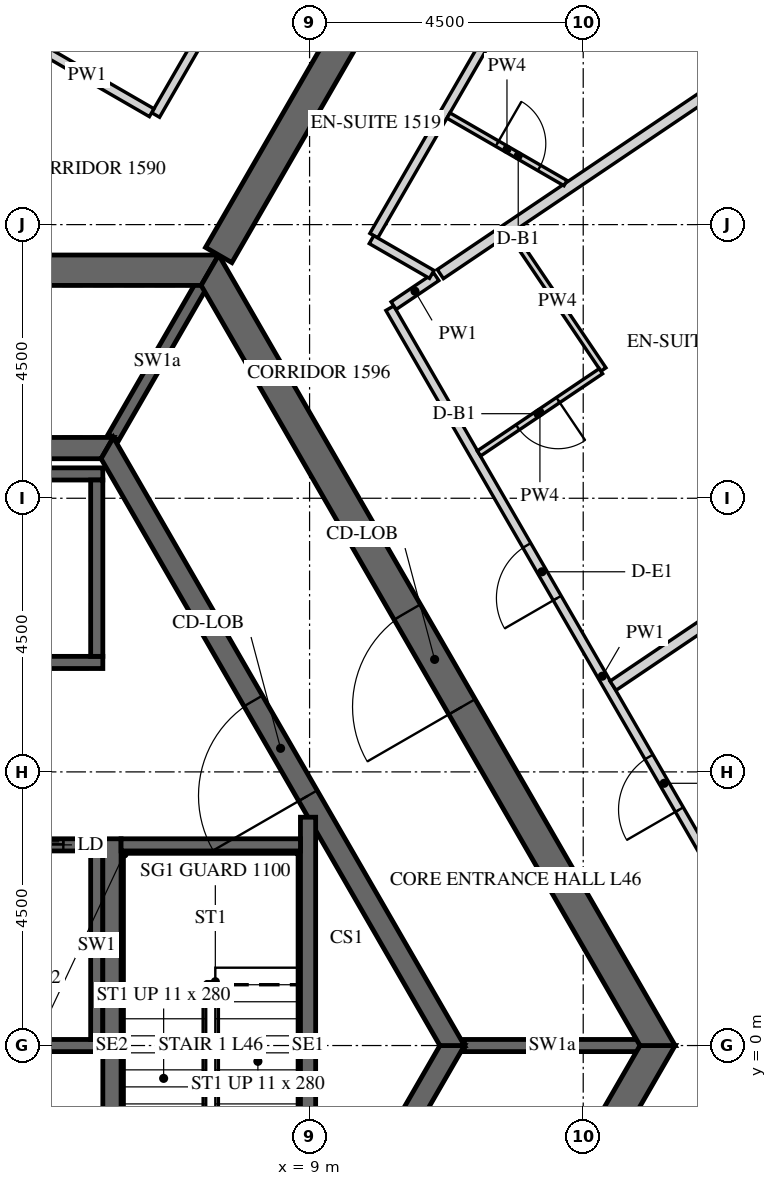
"""IFC4 building model, lengths in metres.
Left out: names, types, materials, properties, quantities, classifications, styles, units other than length and angle.
Written with IfcOpenShell. Run it as: python <this file> out.ifc"""

import sys

from ifc_helpers import new_model, si_unit, direction, frame, frame_2d, origin, place, context, subcontext, project, spatial, polyline, rectangle, outline, extrude, element, fill, save


model = new_model("IFC4")
c1 = context("Model", 3, precision=1e-05, world=origin(), true_north=direction((0.0, 1.0)))
c2 = subcontext(c1, "Body", "Model", "MODEL_VIEW")
j1 = project(units=[si_unit("LENGTHUNIT", "METRE"), si_unit("PLANEANGLEUNIT", "RADIAN")], contexts=[c1])
p1 = place(None, origin())
s1 = spatial("IfcSite", under=j1, at=p1, CompositionType="ELEMENT")
p2 = place(p1, origin())
s2 = spatial("IfcBuilding", under=s1, at=p2, CompositionType="ELEMENT")
p3 = place(p2, frame((0.0, 0.0, 195.6)))
s3 = spatial("IfcBuildingStorey", under=s2, at=p3, CompositionType="ELEMENT", Elevation=195.6)
p4 = place(p3, frame((7.361, -12.75, -0.15), z_axis=(0.0, 0.0, 1.0), x_axis=(0.50000571537, 0.866022103989, 0.0)))
e1 = element("IfcWall", 1, at=p4, inside=s3, PredefinedType="SHEAR", context=c2, shape_type="SweptSolid", body=[
    extrude(outline(polyline([(-0.144, -0.25), (14.867, -0.25), (14.578, 0.25), (0.144, 0.25), (-0.144, -0.25)])), origin(), (0.0, 0.0, 1.0), 3.9),
])
p5 = place(p4, frame((6.49, 0.0, 0.15)))
e2 = element("IfcOpeningElement", 2, at=p5, cuts=e1, PredefinedType="OPENING", context=c2, shape_type="SweptSolid", body=[
    extrude(rectangle(XDim=1.8, YDim=2.4, at=frame_2d((0.9, 1.2))), frame((0.0, 0.26, 0.0), z_axis=(0.0, -1.0, 0.0), x_axis=(1.0, 0.0, 0.0)), (0.0, 0.0, 1.0), 0.52),
])
p6 = place(p3, frame((14.722, 0.0, -0.15), z_axis=(0.0, 0.0, 1.0), x_axis=(-0.50000571537, 0.866022103989, 0.0)))
e3 = element("IfcWall", 3, at=p6, inside=s3, PredefinedType="SHEAR", context=c2, shape_type="SweptSolid", body=[
    extrude(outline(polyline([(-0.144, -0.25), (14.867, -0.25), (14.578, 0.25), (0.144, 0.25), (-0.144, -0.25)])), origin(), (0.0, 0.0, 1.0), 3.9),
])
p7 = place(p6, frame((6.432, 0.0, 0.15)))
e4 = element("IfcOpeningElement", 4, at=p7, cuts=e3, PredefinedType="OPENING", context=c2, shape_type="SweptSolid", body=[
    extrude(rectangle(XDim=1.8, YDim=2.4, at=frame_2d((0.9, 1.2))), frame((0.0, 0.26, 0.0), z_axis=(0.0, -1.0, 0.0), x_axis=(1.0, 0.0, 0.0)), (0.0, 0.0, 1.0), 0.52),
])
p8 = place(p3, frame((7.361, 12.75, -0.15), z_axis=(0.0, 0.0, 1.0), x_axis=(-1.0, 0.0, 0.0)))
e5 = element("IfcWall", 5, at=p8, inside=s3, PredefinedType="SHEAR", context=c2, shape_type="SweptSolid", body=[
    extrude(outline(polyline([(-0.144, -0.25), (14.866, -0.25), (14.578, 0.25), (0.144, 0.25), (-0.144, -0.25)])), origin(), (0.0, 0.0, 1.0), 3.9),
])
p9 = place(p8, frame((6.761, 0.0, 0.15)))
e6 = element("IfcOpeningElement", 6, at=p9, cuts=e5, PredefinedType="OPENING", context=c2, shape_type="SweptSolid", body=[
    extrude(rectangle(XDim=1.2, YDim=2.4, at=frame_2d((0.6, 1.2))), frame((0.0, 0.26, 0.0), z_axis=(0.0, -1.0, 0.0), x_axis=(1.0, 0.0, 0.0)), (0.0, 0.0, 1.0), 0.52),
])
p10 = place(p3, frame((7.506, 13.0, -0.15), z_axis=(0.0, 0.0, 1.0), x_axis=(0.499988271576, 0.866032175087, 0.0)))
e7 = element("IfcWall", 7, at=p10, inside=s3, PredefinedType="SHEAR", context=c2, shape_type="SweptSolid", body=[
    extrude(rectangle(XDim=15.424, YDim=0.5, at=frame_2d((7.712, 0.0))), origin(), (0.0, 0.0, 1.0), 3.9),
])
p11 = place(p10, frame((6.812, 0.0, 0.15)))
e8 = element("IfcOpeningElement", 8, at=p11, cuts=e7, PredefinedType="OPENING", context=c2, shape_type="SweptSolid", body=[
    extrude(rectangle(XDim=1.8, YDim=2.4, at=frame_2d((0.9, 1.2))), frame((0.0, 0.26, 0.0), z_axis=(0.0, -1.0, 0.0), x_axis=(1.0, 0.0, 0.0)), (0.0, 0.0, 1.0), 0.52),
])
p12 = place(p3, frame((5.673, -9.825, -0.15), z_axis=(0.0, 0.0, 1.0), x_axis=(0.499995046907, 0.866028263435, 0.0)))
e9 = element("IfcWall", 9, at=p12, inside=s3, PredefinedType="SHEAR", context=c2, shape_type="SweptSolid", body=[
    extrude(outline(polyline([(-0.101, -0.175), (11.446, -0.175), (11.244, 0.175), (0.101, 0.175), (-0.101, -0.175)])), origin(), (0.0, 0.0, 1.0), 3.9),
])
p13 = place(p12, frame((4.801, 0.0, 0.15)))
e10 = element("IfcOpeningElement", 10, at=p13, cuts=e9, PredefinedType="OPENING", context=c2, shape_type="SweptSolid", body=[
    extrude(rectangle(XDim=1.8, YDim=2.4, at=frame_2d((0.9, 1.2))), frame((0.0, 0.185, 0.0), z_axis=(0.0, -1.0, 0.0), x_axis=(1.0, 0.0, 0.0)), (0.0, 0.0, 1.0), 0.37),
])
p14 = place(p3, frame((11.345, 0.0, -0.15), z_axis=(0.0, 0.0, 1.0), x_axis=(-0.499995046907, 0.866028263435, 0.0)))
e11 = element("IfcWall", 11, at=p14, inside=s3, PredefinedType="SHEAR", context=c2, shape_type="SweptSolid", body=[
    extrude(outline(polyline([(-0.101, -0.175), (11.446, -0.175), (11.244, 0.175), (0.101, 0.175), (-0.101, -0.175)])), origin(), (0.0, 0.0, 1.0), 3.9),
])
p15 = place(p14, frame((4.744, 0.0, 0.15)))
e12 = element("IfcOpeningElement", 12, at=p15, cuts=e11, PredefinedType="OPENING", context=c2, shape_type="SweptSolid", body=[
    extrude(rectangle(XDim=1.8, YDim=2.4, at=frame_2d((0.9, 1.2))), frame((0.0, 0.185, 0.0), z_axis=(0.0, -1.0, 0.0), x_axis=(1.0, 0.0, 0.0)), (0.0, 0.0, 1.0), 0.37),
])
p16 = place(p3, frame((5.673, 9.825, -0.15), z_axis=(0.0, 0.0, 1.0), x_axis=(-1.0, 0.0, 0.0)))
e13 = element("IfcWall", 13, at=p16, inside=s3, PredefinedType="SHEAR", context=c2, shape_type="SweptSolid", body=[
    extrude(outline(polyline([(-0.101, -0.175), (11.446, -0.175), (11.244, 0.175), (0.101, 0.175), (-0.101, -0.175)])), origin(), (0.0, 0.0, 1.0), 3.9),
])
p17 = place(p3, frame((-5.6, 6.3, -0.25), z_axis=(0.0, 0.0, 1.0), x_axis=(1.0, 0.0, 0.0)))
e14 = element("IfcWall", 14, at=p17, inside=s3, PredefinedType="SHEAR", context=c2, shape_type="SweptSolid", body=[
    extrude(rectangle(XDim=11.2, YDim=0.2, at=frame_2d((5.6, 0.0))), origin(), (0.0, 0.0, 1.0), 3.9),
])
p18 = place(p17, frame((8.45, 0.0, 0.25)))
e15 = element("IfcOpeningElement", 15, at=p18, cuts=e14, PredefinedType="OPENING", context=c2, shape_type="SweptSolid", body=[
    extrude(rectangle(XDim=0.9, YDim=2.1, at=frame_2d((0.45, 1.05))), frame((0.0, 0.11, 0.0), z_axis=(0.0, -1.0, 0.0), x_axis=(1.0, 0.0, 0.0)), (0.0, 0.0, 1.0), 0.22),
])
p19 = place(p17, frame((0.65, 0.0, 0.25)))
e16 = element("IfcOpeningElement", 16, at=p19, cuts=e14, PredefinedType="OPENING", context=c2, shape_type="SweptSolid", body=[
    extrude(rectangle(XDim=1.1, YDim=2.1, at=frame_2d((0.55, 1.05))), frame((0.0, 0.11, 0.0), z_axis=(0.0, -1.0, 0.0), x_axis=(1.0, 0.0, 0.0)), (0.0, 0.0, 1.0), 0.22),
])
p20 = place(p17, frame((2.85, 0.0, 0.25)))
e17 = element("IfcOpeningElement", 17, at=p20, cuts=e14, PredefinedType="OPENING", context=c2, shape_type="SweptSolid", body=[
    extrude(rectangle(XDim=1.1, YDim=2.1, at=frame_2d((0.55, 1.05))), frame((0.0, 0.11, 0.0), z_axis=(0.0, -1.0, 0.0), x_axis=(1.0, 0.0, 0.0)), (0.0, 0.0, 1.0), 0.22),
])
p21 = place(p17, frame((5.05, 0.0, 0.25)))
e18 = element("IfcOpeningElement", 18, at=p21, cuts=e14, PredefinedType="OPENING", context=c2, shape_type="SweptSolid", body=[
    extrude(rectangle(XDim=1.1, YDim=2.1, at=frame_2d((0.55, 1.05))), frame((0.0, 0.11, 0.0), z_axis=(0.0, -1.0, 0.0), x_axis=(1.0, 0.0, 0.0)), (0.0, 0.0, 1.0), 0.22),
])
p22 = place(p3, frame((-5.6, 9.4, -0.25), z_axis=(0.0, 0.0, 1.0), x_axis=(1.0, 0.0, 0.0)))
e19 = element("IfcWall", 19, at=p22, inside=s3, PredefinedType="SHEAR", context=c2, shape_type="SweptSolid", body=[
    extrude(rectangle(XDim=11.2, YDim=0.2, at=frame_2d((5.6, 0.0))), origin(), (0.0, 0.0, 1.0), 3.9),
])
p23 = place(p3, frame((5.5, 6.4, -0.25), z_axis=(0.0, 0.0, 1.0), x_axis=(0.0, 1.0, 0.0)))
e20 = element("IfcWall", 20, at=p23, inside=s3, PredefinedType="SHEAR", context=c2, shape_type="SweptSolid", body=[
    extrude(rectangle(XDim=2.9, YDim=0.2, at=frame_2d((1.45, 0.0))), origin(), (0.0, 0.0, 1.0), 3.9),
])
p24 = place(p3, frame((-5.6, 3.3, -0.25), z_axis=(0.0, 0.0, 1.0), x_axis=(1.0, 0.0, 0.0)))
e21 = element("IfcWall", 21, at=p24, inside=s3, PredefinedType="SHEAR", context=c2, shape_type="SweptSolid", body=[
    extrude(rectangle(XDim=11.2, YDim=0.2, at=frame_2d((5.6, 0.0))), origin(), (0.0, 0.0, 1.0), 3.9),
])
p25 = place(p24, frame((0.65, 0.0, 0.25)))
e22 = element("IfcOpeningElement", 22, at=p25, cuts=e21, PredefinedType="OPENING", context=c2, shape_type="SweptSolid", body=[
    extrude(rectangle(XDim=1.1, YDim=2.1, at=frame_2d((0.55, 1.05))), frame((0.0, 0.11, 0.0), z_axis=(0.0, -1.0, 0.0), x_axis=(1.0, 0.0, 0.0)), (0.0, 0.0, 1.0), 0.22),
])
p26 = place(p24, frame((2.85, 0.0, 0.25)))
e23 = element("IfcOpeningElement", 23, at=p26, cuts=e21, PredefinedType="OPENING", context=c2, shape_type="SweptSolid", body=[
    extrude(rectangle(XDim=1.1, YDim=2.1, at=frame_2d((0.55, 1.05))), frame((0.0, 0.11, 0.0), z_axis=(0.0, -1.0, 0.0), x_axis=(1.0, 0.0, 0.0)), (0.0, 0.0, 1.0), 0.22),
])
p27 = place(p24, frame((5.05, 0.0, 0.25)))
e24 = element("IfcOpeningElement", 24, at=p27, cuts=e21, PredefinedType="OPENING", context=c2, shape_type="SweptSolid", body=[
    extrude(rectangle(XDim=1.1, YDim=2.1, at=frame_2d((0.55, 1.05))), frame((0.0, 0.11, 0.0), z_axis=(0.0, -1.0, 0.0), x_axis=(1.0, 0.0, 0.0)), (0.0, 0.0, 1.0), 0.22),
])
p28 = place(p24, frame((7.25, 0.0, 0.25)))
e25 = element("IfcOpeningElement", 25, at=p28, cuts=e21, PredefinedType="OPENING", context=c2, shape_type="SweptSolid", body=[
    extrude(rectangle(XDim=1.1, YDim=2.1, at=frame_2d((0.55, 1.05))), frame((0.0, 0.11, 0.0), z_axis=(0.0, -1.0, 0.0), x_axis=(1.0, 0.0, 0.0)), (0.0, 0.0, 1.0), 0.22),
])
p29 = place(p24, frame((9.45, 0.0, 0.25)))
e26 = element("IfcOpeningElement", 26, at=p29, cuts=e21, PredefinedType="OPENING", context=c2, shape_type="SweptSolid", body=[
    extrude(rectangle(XDim=1.1, YDim=2.1, at=frame_2d((0.55, 1.05))), frame((0.0, 0.11, 0.0), z_axis=(0.0, -1.0, 0.0), x_axis=(1.0, 0.0, 0.0)), (0.0, 0.0, 1.0), 0.22),
])
p30 = place(p3, frame((-5.6, 0.0, -0.25), z_axis=(0.0, 0.0, 1.0), x_axis=(1.0, 0.0, 0.0)))
e27 = element("IfcWall", 27, at=p30, inside=s3, PredefinedType="SHEAR", context=c2, shape_type="SweptSolid", body=[
    extrude(rectangle(XDim=11.2, YDim=0.2, at=frame_2d((5.6, 0.0))), origin(), (0.0, 0.0, 1.0), 3.9),
])
p31 = place(p3, frame((5.5, 0.1, -0.25), z_axis=(0.0, 0.0, 1.0), x_axis=(0.0, 1.0, 0.0)))
e28 = element("IfcWall", 28, at=p31, inside=s3, PredefinedType="SHEAR", context=c2, shape_type="SweptSolid", body=[
    extrude(rectangle(XDim=3.1, YDim=0.2, at=frame_2d((1.55, 0.0))), origin(), (0.0, 0.0, 1.0), 3.9),
])
for number, where, z_axis, x_axis in (
    (29, (11.547, 0.0, -0.15), (0.0, 0.0, 1.0), (1.0, 0.0, 0.0)),
    (30, (5.773, 10.0, -0.15), (0.0, 0.0, 1.0), (0.5, 0.866, 0.0)),
):
    element("IfcWall", number, at=place(p3, frame(where, z_axis=z_axis, x_axis=x_axis)), inside=s3, PredefinedType="SHEAR", context=c2, shape_type="SweptSolid", body=[
        extrude(rectangle(XDim=2.887, YDim=0.2, at=frame_2d((1.443, 0.0))), origin(), (0.0, 0.0, 1.0), 3.9),
    ])
p32 = place(p3, frame((5.75, -3.4, -0.25), z_axis=(0.0, 0.0, 1.0), x_axis=(0.0, 1.0, 0.0)))
e31 = element("IfcWall", 31, at=p32, inside=s3, PredefinedType="SHEAR", context=c2, shape_type="SweptSolid", body=[
    extrude(rectangle(XDim=6.8, YDim=0.3, at=frame_2d((3.4, 0.0))), origin(), (0.0, 0.0, 1.0), 3.9),
])
p33 = place(p3, frame((8.975, -3.755, -0.25), z_axis=(0.0, 0.0, 1.0), x_axis=(0.0, 1.0, 0.0)))
e32 = element("IfcWall", 32, at=p33, inside=s3, PredefinedType="SHEAR", context=c2, shape_type="SweptSolid", body=[
    extrude(rectangle(XDim=7.51, YDim=0.25, at=frame_2d((3.755, 0.0))), origin(), (0.0, 0.0, 1.0), 3.9),
])
p34 = place(p3, frame((5.9, 3.3, -0.25), z_axis=(0.0, 0.0, 1.0), x_axis=(1.0, 0.0, 0.0)))
e33 = element("IfcWall", 33, at=p34, inside=s3, PredefinedType="SHEAR", context=c2, shape_type="SweptSolid", body=[
    extrude(rectangle(XDim=2.95, YDim=0.2, at=frame_2d((1.475, 0.0))), origin(), (0.0, 0.0, 1.0), 3.9),
])
p35 = place(p3, frame((10.149, 21.678, 0.0), z_axis=(0.0, 0.0, 1.0), x_axis=(-0.500020076982, -0.866013812023, 0.0)))
e34 = element("IfcWall", 34, at=p35, inside=s3, PredefinedType="PARTITIONING", context=c2, shape_type="SweptSolid", body=[
    extrude(rectangle(XDim=7.361, YDim=0.15, at=frame_2d((3.681, 0.0))), origin(), (0.0, 0.0, 1.0), 2.988),
])
p36 = place(p35, frame((2.018, 0.0, 0.0)))
e35 = element("IfcOpeningElement", 35, at=p36, cuts=e34, PredefinedType="OPENING", context=c2, shape_type="SweptSolid", body=[
    extrude(rectangle(XDim=1.0, YDim=2.1, at=frame_2d((0.5, 1.05))), frame((0.0, 0.085, 0.0), z_axis=(0.0, -1.0, 0.0), x_axis=(1.0, 0.0, 0.0)), (0.0, 0.0, 1.0), 0.17),
])
p37 = place(p3, frame((6.403, 15.341, 0.0), z_axis=(0.0, 0.0, 1.0), x_axis=(-0.8660013066, 0.500041735226, 0.0)))
e36 = element("IfcWall", 36, at=p37, inside=s3, PredefinedType="PARTITIONING", context=c2, shape_type="SweptSolid", body=[
    extrude(rectangle(XDim=2.449, YDim=0.15, at=frame_2d((1.225, 0.0))), origin(), (0.0, 0.0, 1.0), 2.988),
])
p38 = place(p3, frame((9.887, -12.875, 0.0), z_axis=(0.0, 0.0, 1.0), x_axis=(0.499998228944, 0.866026426302, 0.0)))
e37 = element("IfcWall", 37, at=p38, inside=s3, PredefinedType="PARTITIONING", context=c2, shape_type="SweptSolid", body=[
    extrude(rectangle(XDim=14.867, YDim=0.15, at=frame_2d((7.433, 0.0))), origin(), (0.0, 0.0, 1.0), 2.988),
])
p39 = place(p38, frame((3.519, 0.0, 0.0)))
e38 = element("IfcOpeningElement", 38, at=p39, cuts=e37, PredefinedType="OPENING", context=c2, shape_type="SweptSolid", body=[
    extrude(rectangle(XDim=1.0, YDim=2.1, at=frame_2d((0.5, 1.05))), frame((0.0, 0.085, 0.0), z_axis=(0.0, -1.0, 0.0), x_axis=(1.0, 0.0, 0.0)), (0.0, 0.0, 1.0), 0.17),
])
p40 = place(p38, frame((6.824, 0.0, 0.0)))
e39 = element("IfcOpeningElement", 39, at=p40, cuts=e37, PredefinedType="OPENING", context=c2, shape_type="SweptSolid", body=[
    extrude(rectangle(XDim=1.0, YDim=2.1, at=frame_2d((0.5, 1.05))), frame((0.0, 0.085, 0.0), z_axis=(0.0, -1.0, 0.0), x_axis=(1.0, 0.0, 0.0)), (0.0, 0.0, 1.0), 0.17),
])
p41 = place(p38, frame((10.424, 0.0, 0.0)))
e40 = element("IfcOpeningElement", 40, at=p41, cuts=e37, PredefinedType="OPENING", context=c2, shape_type="SweptSolid", body=[
    extrude(rectangle(XDim=1.0, YDim=2.1, at=frame_2d((0.5, 1.05))), frame((0.0, 0.085, 0.0), z_axis=(0.0, -1.0, 0.0), x_axis=(1.0, 0.0, 0.0)), (0.0, 0.0, 1.0), 0.17),
])
p42 = place(p38, frame((13.667, 0.0, 0.0)))
e41 = element("IfcOpeningElement", 41, at=p42, cuts=e37, PredefinedType="OPENING", context=c2, shape_type="SweptSolid", body=[
    extrude(rectangle(XDim=1.0, YDim=2.1, at=frame_2d((0.5, 1.05))), frame((0.0, 0.085, 0.0), z_axis=(0.0, -1.0, 0.0), x_axis=(1.0, 0.0, 0.0)), (0.0, 0.0, 1.0), 0.17),
])
p43 = place(p3, frame((17.308, 0.022, 0.0), z_axis=(0.0, 0.0, 1.0), x_axis=(-0.500009245501, 0.866020065826, 0.0)))
e42 = element("IfcWall", 42, at=p43, inside=s3, PredefinedType="PARTITIONING", context=c2, shape_type="SweptSolid", body=[
    extrude(rectangle(XDim=13.976, YDim=0.15, at=frame_2d((6.988, 0.0))), origin(), (0.0, 0.0, 1.0), 2.988),
])
p44 = place(p43, frame((4.454, 0.0, 0.0)))
e43 = element("IfcOpeningElement", 43, at=p44, cuts=e42, PredefinedType="OPENING", context=c2, shape_type="SweptSolid", body=[
    extrude(rectangle(XDim=1.0, YDim=2.1, at=frame_2d((0.5, 1.05))), frame((0.0, 0.085, 0.0), z_axis=(0.0, -1.0, 0.0), x_axis=(1.0, 0.0, 0.0)), (0.0, 0.0, 1.0), 0.17),
])
p45 = place(p43, frame((8.471, 0.0, 0.0)))
e44 = element("IfcOpeningElement", 44, at=p45, cuts=e42, PredefinedType="OPENING", context=c2, shape_type="SweptSolid", body=[
    extrude(rectangle(XDim=1.0, YDim=2.1, at=frame_2d((0.5, 1.05))), frame((0.0, 0.085, 0.0), z_axis=(0.0, -1.0, 0.0), x_axis=(1.0, 0.0, 0.0)), (0.0, 0.0, 1.0), 0.17),
])
p46 = place(p3, frame((10.382, 12.168, 0.0), z_axis=(0.0, 0.0, 1.0), x_axis=(0.828935479655, 0.559344232623, 0.0)))
e45 = element("IfcWall", 45, at=p46, inside=s3, PredefinedType="PARTITIONING", context=c2, shape_type="SweptSolid", body=[
    extrude(rectangle(XDim=0.848, YDim=0.15, at=frame_2d((0.424, 0.0))), origin(), (0.0, 0.0, 1.0), 2.988),
])
p47 = place(p3, frame((10.056, 13.318, 0.0), z_axis=(0.0, 0.0, 1.0), x_axis=(0.499995202058, 0.86602817386, 0.0)))
e46 = element("IfcWall", 46, at=p47, inside=s3, PredefinedType="PARTITIONING", context=c2, shape_type="SweptSolid", body=[
    extrude(rectangle(XDim=7.361, YDim=0.15, at=frame_2d((3.68, 0.0))), origin(), (0.0, 0.0, 1.0), 2.988),
])
p48 = place(p47, frame((4.168, 0.0, 0.0)))
e47 = element("IfcOpeningElement", 47, at=p48, cuts=e46, PredefinedType="OPENING", context=c2, shape_type="SweptSolid", body=[
    extrude(rectangle(XDim=1.0, YDim=2.1, at=frame_2d((0.5, 1.05))), frame((0.0, 0.085, 0.0), z_axis=(0.0, -1.0, 0.0), x_axis=(1.0, 0.0, 0.0)), (0.0, 0.0, 1.0), 0.17),
])
p49 = place(p3, frame((11.009, 12.681, 0.0), z_axis=(0.0, 0.0, 1.0), x_axis=(-0.86605406138, 0.499950360304, 0.0)))
e48 = element("IfcWall", 48, at=p49, inside=s3, PredefinedType="PARTITIONING", context=c2, shape_type="SweptSolid", body=[
    extrude(rectangle(XDim=1.144, YDim=0.15, at=frame_2d((0.572, 0.0))), origin(), (0.0, 0.0, 1.0), 2.988),
])
p50 = place(p3, frame((24.389, 12.931, 0.0), z_axis=(0.0, 0.0, 1.0), x_axis=(-0.829040439793, -0.559188652593, 0.0)))
e49 = element("IfcWall", 49, at=p50, inside=s3, PredefinedType="PARTITIONING", context=c2, shape_type="SweptSolid", body=[
    extrude(rectangle(XDim=12.542, YDim=0.18, at=frame_2d((6.271, 0.0))), origin(), (0.0, 0.0, 1.0), 2.988),
])
p51 = place(p3, frame((12.317, 13.364, 0.0), z_axis=(0.0, 0.0, 1.0), x_axis=(0.559203592691, -0.829030362485, 0.0)))
e50 = element("IfcWall", 50, at=p51, inside=s3, PredefinedType="PARTITIONING", context=c2, shape_type="SweptSolid", body=[
    extrude(rectangle(XDim=2.71, YDim=0.1, at=frame_2d((1.355, 0.0))), origin(), (0.0, 0.0, 1.0), 2.988),
])
p52 = place(p3, frame((13.791, 11.09, 0.0), z_axis=(0.0, 0.0, 1.0), x_axis=(-0.829056894888, -0.559164255866, 0.0)))
e51 = element("IfcWall", 51, at=p52, inside=s3, PredefinedType="PARTITIONING", context=c2, shape_type="SweptSolid", body=[
    extrude(rectangle(XDim=2.419, YDim=0.1, at=frame_2d((1.209, 0.0))), origin(), (0.0, 0.0, 1.0), 2.988),
])
p53 = place(p52, frame((0.85, 0.0, 0.0)))
e52 = element("IfcOpeningElement", 52, at=p53, cuts=e51, PredefinedType="OPENING", context=c2, shape_type="SweptSolid", body=[
    extrude(rectangle(XDim=0.8, YDim=2.1, at=frame_2d((0.4, 1.05))), frame((0.0, 0.06, 0.0), z_axis=(0.0, -1.0, 0.0), x_axis=(1.0, 0.0, 0.0)), (0.0, 0.0, 1.0), 0.12),
])
p54 = place(p3, frame((20.363, 18.9, 0.0), z_axis=(0.0, 0.0, 1.0), x_axis=(-0.82903304346, -0.559199618072, 0.0)))
e53 = element("IfcWall", 53, at=p54, inside=s3, PredefinedType="PARTITIONING", context=c2, shape_type="SweptSolid", body=[
    extrude(rectangle(XDim=11.112, YDim=0.18, at=frame_2d((5.556, 0.0))), origin(), (0.0, 0.0, 1.0), 2.988),
])
p55 = place(p3, frame((11.284, 15.294, 0.0), z_axis=(0.0, 0.0, 1.0), x_axis=(0.866017295027, -0.500014044516, 0.0)))
e54 = element("IfcWall", 54, at=p55, inside=s3, PredefinedType="PARTITIONING", context=c2, shape_type="SweptSolid", body=[
    extrude(rectangle(XDim=2.223, YDim=0.1, at=frame_2d((1.111, 0.0))), origin(), (0.0, 0.0, 1.0), 2.988),
])
p56 = place(p55, frame((0.925, 0.0, 0.0)))
e55 = element("IfcOpeningElement", 55, at=p56, cuts=e54, PredefinedType="OPENING", context=c2, shape_type="SweptSolid", body=[
    extrude(rectangle(XDim=0.8, YDim=2.1, at=frame_2d((0.4, 1.05))), frame((0.0, 0.06, 0.0), z_axis=(0.0, -1.0, 0.0), x_axis=(1.0, 0.0, 0.0)), (0.0, 0.0, 1.0), 0.12),
])
p57 = place(p7, origin())
e56 = element("IfcDoor", 56, at=p57, inside=s3, OperationType="DOUBLE_DOOR_SINGLE_SWING", PredefinedType="DOOR", context=c2, shape_type="SweptSolid", body=[
    extrude(rectangle(XDim=1.8, YDim=2.4, at=frame_2d((0.9, 1.2))), frame((0.0, 0.025, 0.0), z_axis=(0.0, -1.0, 0.0), x_axis=(1.0, 0.0, 0.0)), (0.0, 0.0, 1.0), 0.05),
])
fill(e4, e56)
p58 = place(p15, origin())
e57 = element("IfcDoor", 57, at=p58, inside=s3, OperationType="DOUBLE_DOOR_SINGLE_SWING", PredefinedType="DOOR", context=c2, shape_type="SweptSolid", body=[
    extrude(rectangle(XDim=1.8, YDim=2.4, at=frame_2d((0.9, 1.2))), frame((0.0, 0.025, 0.0), z_axis=(0.0, -1.0, 0.0), x_axis=(1.0, 0.0, 0.0)), (0.0, 0.0, 1.0), 0.05),
])
fill(e12, e57)
p59 = place(p29, origin())
e58 = element("IfcDoor", 58, at=p59, inside=s3, OperationType="SLIDING_TO_LEFT", PredefinedType="DOOR", context=c2, shape_type="SweptSolid", body=[
    extrude(rectangle(XDim=1.1, YDim=2.1, at=frame_2d((0.55, 1.05))), frame((0.0, 0.025, 0.0), z_axis=(0.0, -1.0, 0.0), x_axis=(1.0, 0.0, 0.0)), (0.0, 0.0, 1.0), 0.05),
])
fill(e26, e58)
p60 = place(p44, origin())
e59 = element("IfcDoor", 59, at=p60, inside=s3, OperationType="SINGLE_SWING_LEFT", PredefinedType="DOOR", context=c2, shape_type="SweptSolid", body=[
    extrude(rectangle(XDim=1.0, YDim=2.1, at=frame_2d((0.5, 1.05))), frame((0.0, 0.025, 0.0), z_axis=(0.0, -1.0, 0.0), x_axis=(1.0, 0.0, 0.0)), (0.0, 0.0, 1.0), 0.05),
])
fill(e43, e59)
p61 = place(p45, origin())
e60 = element("IfcDoor", 60, at=p61, inside=s3, OperationType="SINGLE_SWING_RIGHT", PredefinedType="DOOR", context=c2, shape_type="SweptSolid", body=[
    extrude(rectangle(XDim=1.0, YDim=2.1, at=frame_2d((0.5, 1.05))), frame((0.0, 0.025, 0.0), z_axis=(0.0, -1.0, 0.0), x_axis=(1.0, 0.0, 0.0)), (0.0, 0.0, 1.0), 0.05),
])
fill(e44, e60)
p62 = place(p53, origin())
e61 = element("IfcDoor", 61, at=p62, inside=s3, OperationType="SINGLE_SWING_LEFT", PredefinedType="DOOR", context=c2, shape_type="SweptSolid", body=[
    extrude(rectangle(XDim=0.8, YDim=2.1, at=frame_2d((0.4, 1.05))), frame((0.0, 0.025, 0.0), z_axis=(0.0, -1.0, 0.0), x_axis=(1.0, 0.0, 0.0)), (0.0, 0.0, 1.0), 0.05),
])
fill(e52, e61)
p63 = place(p56, origin())
e62 = element("IfcDoor", 62, at=p63, inside=s3, OperationType="SINGLE_SWING_LEFT", PredefinedType="DOOR", context=c2, shape_type="SweptSolid", body=[
    extrude(rectangle(XDim=0.8, YDim=2.1, at=frame_2d((0.4, 1.05))), frame((0.0, 0.025, 0.0), z_axis=(0.0, -1.0, 0.0), x_axis=(1.0, 0.0, 0.0)), (0.0, 0.0, 1.0), 0.05),
])
fill(e55, e62)
save(model, sys.argv[1])
